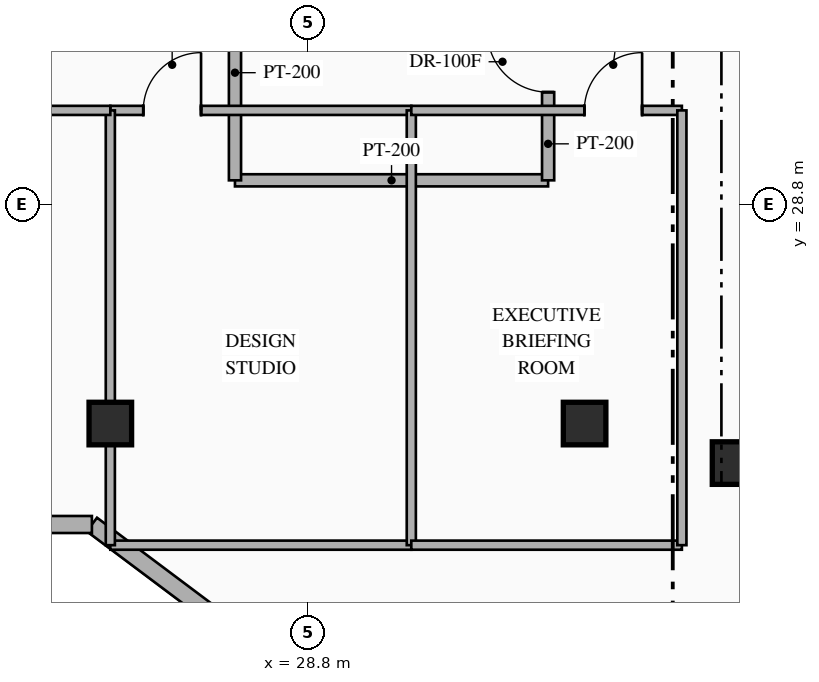
"""IFC4 building model, lengths in metres.
Left out: names, types, materials, properties, quantities, classifications, styles, units other than length and angle.
Written with IfcOpenShell. Run it as: python <this file> out.ifc"""

import sys

from ifc_helpers import new_model, si_unit, direction, frame, frame_2d, origin, origin_2d, place, context, subcontext, project, spatial, rectangle, hollow_rectangle, extrude, element, fill, save


model = new_model("IFC4")
c1 = context("Model", 3, precision=1e-05, world=origin(), true_north=direction((0.0, 1.0)))
c2 = subcontext(c1, "Body", "Model", "MODEL_VIEW")
j1 = project(units=[si_unit("LENGTHUNIT", "METRE"), si_unit("PLANEANGLEUNIT", "RADIAN")], contexts=[c1])
p1 = place(None, origin())
s1 = spatial("IfcSite", under=j1, at=p1, CompositionType="ELEMENT")
p2 = place(p1, origin())
s2 = spatial("IfcBuilding", under=s1, at=p2, CompositionType="ELEMENT")
p3 = place(p2, frame((0.0, 0.0, 227.55)))
s3 = spatial("IfcBuildingStorey", under=s2, at=p3, CompositionType="ELEMENT", Elevation=227.55)
for number, where, z_axis, x_axis in (
    (1, (35.8, 24.55, 0.0), (0.0, 0.0, 1.0), (1.0, 0.0, 0.0)),
    (2, (25.55, 25.2, 0.0), (0.0, 0.0, 1.0), (1.0, 0.0, 0.0)),
    (3, (33.35, 25.2, 0.0), (0.0, 0.0, 1.0), (1.0, 0.0, 0.0)),
):
    element("IfcColumn", number, at=place(p3, frame(where, z_axis=z_axis, x_axis=x_axis)), inside=s3, PredefinedType="COLUMN", context=c2, shape_type="SweptSolid", body=[
        extrude(hollow_rectangle(XDim=0.7, YDim=0.7, WallThickness=0.028, at=origin_2d()), origin(), (0.0, 0.0, 1.0), 3.6),
    ])
p4 = place(p3, frame((44.918, 8.787, 0.0), z_axis=(0.0, 0.0, 1.0), x_axis=(-0.800004765927, 0.599993645378, 0.0)))
e4 = element("IfcWall", 4, at=p4, inside=s3, PredefinedType="STANDARD", context=c2, shape_type="SweptSolid", body=[
    extrude(rectangle(XDim=24.588, YDim=0.28, at=frame_2d((12.294, 0.0))), origin(), (0.0, 0.0, 1.0), 3.35),
])
p5 = place(p3, frame((25.247, 23.54, 0.0), z_axis=(0.0, 0.0, 1.0), x_axis=(-1.0, 0.0, 0.0)))
e5 = element("IfcWall", 5, at=p5, inside=s3, PredefinedType="STANDARD", context=c2, shape_type="SweptSolid", body=[
    extrude(rectangle(XDim=4.789, YDim=0.28, at=frame_2d((2.395, 0.0))), origin(), (0.0, 0.0, 1.0), 3.35),
])
p6 = place(p3, frame((27.6, 29.2, 0.0), z_axis=(0.0, 0.0, 1.0), x_axis=(1.0, 0.0, 0.0)))
e6 = element("IfcWall", 6, at=p6, inside=s3, PredefinedType="STANDARD", context=c2, shape_type="SweptSolid", body=[
    extrude(rectangle(XDim=5.15, YDim=0.2, at=frame_2d((2.575, 0.0))), origin(), (0.0, 0.0, 1.0), 3.35),
])
p7 = place(p3, frame((27.6, 29.2, 0.0), z_axis=(0.0, 0.0, 1.0), x_axis=(0.0, 1.0, 0.0)))
e7 = element("IfcWall", 7, at=p7, inside=s3, PredefinedType="STANDARD", context=c2, shape_type="SweptSolid", body=[
    extrude(rectangle(XDim=3.54, YDim=0.2, at=frame_2d((1.77, 0.0))), origin(), (0.0, 0.0, 1.0), 3.35),
])
p8 = place(p3, frame((32.75, 29.2, 0.0), z_axis=(0.0, 0.0, 1.0), x_axis=(0.0, 1.0, 0.0)))
e8 = element("IfcWall", 8, at=p8, inside=s3, PredefinedType="STANDARD", context=c2, shape_type="SweptSolid", body=[
    extrude(rectangle(XDim=3.54, YDim=0.2, at=frame_2d((1.77, 0.0))), origin(), (0.0, 0.0, 1.0), 3.35),
])
p9 = place(p8, frame((1.45, 0.0, 0.0)))
e9 = element("IfcOpeningElement", 9, at=p9, cuts=e8, PredefinedType="OPENING", context=c2, shape_type="SweptSolid", body=[
    extrude(rectangle(XDim=1.0, YDim=2.2, at=frame_2d((0.5, 1.1))), frame((0.0, 0.11, 0.0), z_axis=(0.0, -1.0, 0.0), x_axis=(1.0, 0.0, 0.0)), (0.0, 0.0, 1.0), 0.22),
])
p10 = place(p3, frame((25.55, 23.2, 0.0), z_axis=(0.0, 0.0, 1.0), x_axis=(1.0, 0.0, 0.0)))
e10 = element("IfcWall", 10, at=p10, inside=s3, PredefinedType="PARTITIONING", context=c2, shape_type="SweptSolid", body=[
    extrude(rectangle(XDim=4.95, YDim=0.15, at=frame_2d((2.475, 0.0))), origin(), (0.0, 0.0, 1.0), 3.35),
])
p11 = place(p3, frame((25.55, 30.35, 0.0), z_axis=(0.0, 0.0, 1.0), x_axis=(1.0, 0.0, 0.0)))
e11 = element("IfcWall", 11, at=p11, inside=s3, PredefinedType="PARTITIONING", context=c2, shape_type="SweptSolid", body=[
    extrude(rectangle(XDim=4.95, YDim=0.15, at=frame_2d((2.475, 0.0))), origin(), (0.0, 0.0, 1.0), 3.35),
])
p12 = place(p11, frame((0.542, 0.0, 0.0)))
e12 = element("IfcOpeningElement", 12, at=p12, cuts=e11, PredefinedType="OPENING", context=c2, shape_type="SweptSolid", body=[
    extrude(rectangle(XDim=0.95, YDim=2.15, at=frame_2d((0.475, 1.075))), frame((0.0, 0.085, 0.0), z_axis=(0.0, -1.0, 0.0), x_axis=(1.0, 0.0, 0.0)), (0.0, 0.0, 1.0), 0.17),
])
p13 = place(p3, frame((25.55, 23.2, 0.0), z_axis=(0.0, 0.0, 1.0), x_axis=(0.0, 1.0, 0.0)))
e13 = element("IfcWall", 13, at=p13, inside=s3, PredefinedType="PARTITIONING", context=c2, shape_type="SweptSolid", body=[
    extrude(rectangle(XDim=7.15, YDim=0.15, at=frame_2d((3.575, 0.0))), origin(), (0.0, 0.0, 1.0), 2.757),
])
p14 = place(p3, frame((30.5, 23.2, 0.0), z_axis=(0.0, 0.0, 1.0), x_axis=(0.0, 1.0, 0.0)))
e14 = element("IfcWall", 14, at=p14, inside=s3, PredefinedType="PARTITIONING", context=c2, shape_type="SweptSolid", body=[
    extrude(rectangle(XDim=7.15, YDim=0.15, at=frame_2d((3.575, 0.0))), origin(), (0.0, 0.0, 1.0), 3.35),
])
p15 = place(p3, frame((30.5, 23.2, 0.0), z_axis=(0.0, 0.0, 1.0), x_axis=(1.0, 0.0, 0.0)))
e15 = element("IfcWall", 15, at=p15, inside=s3, PredefinedType="PARTITIONING", context=c2, shape_type="SweptSolid", body=[
    extrude(rectangle(XDim=4.45, YDim=0.15, at=frame_2d((2.225, 0.0))), origin(), (0.0, 0.0, 1.0), 3.35),
])
p16 = place(p3, frame((30.5, 30.35, 0.0), z_axis=(0.0, 0.0, 1.0), x_axis=(1.0, 0.0, 0.0)))
e16 = element("IfcWall", 16, at=p16, inside=s3, PredefinedType="PARTITIONING", context=c2, shape_type="SweptSolid", body=[
    extrude(rectangle(XDim=4.45, YDim=0.15, at=frame_2d((2.225, 0.0))), origin(), (0.0, 0.0, 1.0), 3.35),
])
p17 = place(p16, frame((2.846, 0.0, 0.0)))
e17 = element("IfcOpeningElement", 17, at=p17, cuts=e16, PredefinedType="OPENING", context=c2, shape_type="SweptSolid", body=[
    extrude(rectangle(XDim=0.95, YDim=2.15, at=frame_2d((0.475, 1.075))), frame((0.0, 0.085, 0.0), z_axis=(0.0, -1.0, 0.0), x_axis=(1.0, 0.0, 0.0)), (0.0, 0.0, 1.0), 0.17),
])
p18 = place(p3, frame((34.95, 23.2, 0.0), z_axis=(0.0, 0.0, 1.0), x_axis=(0.0, 1.0, 0.0)))
e18 = element("IfcWall", 18, at=p18, inside=s3, PredefinedType="PARTITIONING", context=c2, shape_type="SweptSolid", body=[
    extrude(rectangle(XDim=7.15, YDim=0.15, at=frame_2d((3.575, 0.0))), origin(), (0.0, 0.0, 1.0), 3.35),
])
p19 = place(p3, frame((22.25, 30.35, 0.0), z_axis=(0.0, 0.0, 1.0), x_axis=(1.0, 0.0, 0.0)))
e19 = element("IfcWall", 19, at=p19, inside=s3, PredefinedType="PARTITIONING", context=c2, shape_type="SweptSolid", body=[
    extrude(rectangle(XDim=3.3, YDim=0.15, at=frame_2d((1.65, 0.0))), origin(), (0.0, 0.0, 1.0), 3.35),
])
p20 = place(p19, frame((1.175, 0.0, 0.0)))
e20 = element("IfcOpeningElement", 20, at=p20, cuts=e19, PredefinedType="OPENING", context=c2, shape_type="SweptSolid", body=[
    extrude(rectangle(XDim=0.95, YDim=2.15, at=frame_2d((0.475, 1.075))), frame((0.0, 0.085, 0.0), z_axis=(0.0, -1.0, 0.0), x_axis=(1.0, 0.0, 0.0)), (0.0, 0.0, 1.0), 0.17),
])
p21 = place(p9, origin())
e21 = element("IfcDoor", 21, at=p21, inside=s3, OperationType="SINGLE_SWING_RIGHT", PredefinedType="DOOR", context=c2, shape_type="SweptSolid", body=[
    extrude(rectangle(XDim=1.0, YDim=2.2, at=frame_2d((0.5, 1.1))), frame((0.0, 0.025, 0.0), z_axis=(0.0, -1.0, 0.0), x_axis=(1.0, 0.0, 0.0)), (0.0, 0.0, 1.0), 0.05),
])
fill(e9, e21)
p22 = place(p12, origin())
e22 = element("IfcDoor", 22, at=p22, inside=s3, OperationType="SINGLE_SWING_RIGHT", PredefinedType="DOOR", context=c2, shape_type="SweptSolid", body=[
    extrude(rectangle(XDim=0.95, YDim=2.15, at=frame_2d((0.475, 1.075))), frame((0.0, 0.025, 0.0), z_axis=(0.0, -1.0, 0.0), x_axis=(1.0, 0.0, 0.0)), (0.0, 0.0, 1.0), 0.05),
])
fill(e12, e22)
p23 = place(p17, origin())
e23 = element("IfcDoor", 23, at=p23, inside=s3, OperationType="SINGLE_SWING_RIGHT", PredefinedType="DOOR", context=c2, shape_type="SweptSolid", body=[
    extrude(rectangle(XDim=0.95, YDim=2.15, at=frame_2d((0.475, 1.075))), frame((0.0, 0.025, 0.0), z_axis=(0.0, -1.0, 0.0), x_axis=(1.0, 0.0, 0.0)), (0.0, 0.0, 1.0), 0.05),
])
fill(e17, e23)
save(model, sys.argv[1])
